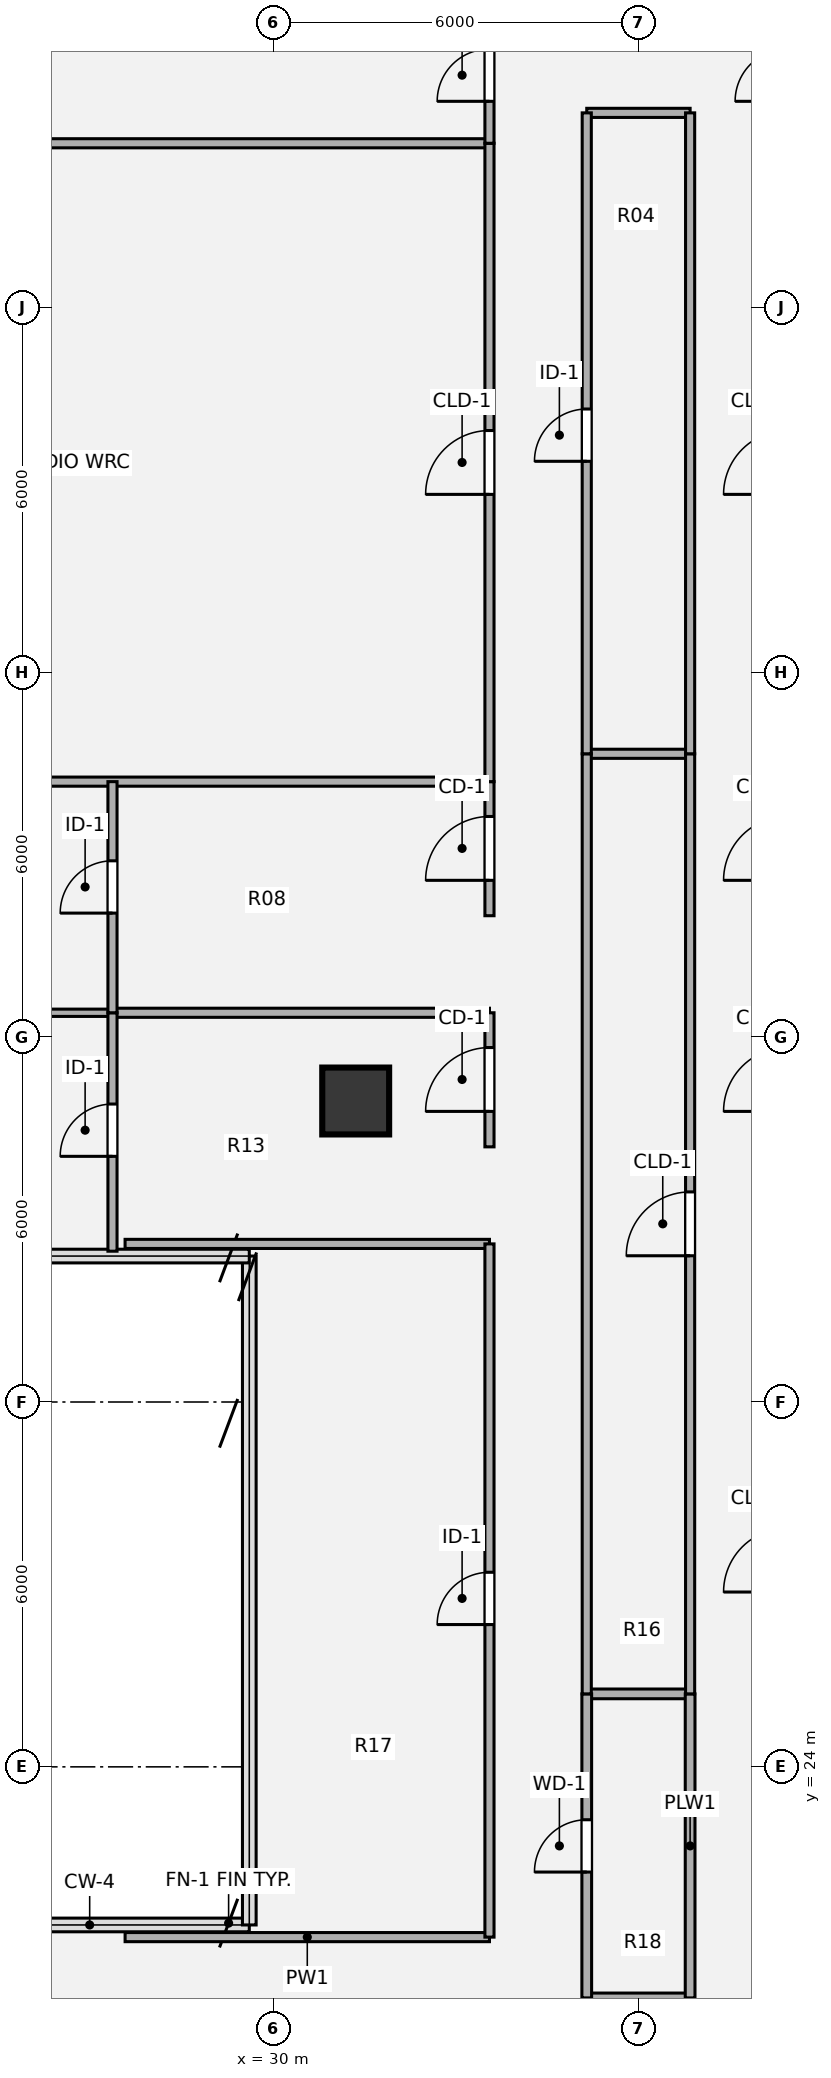
"""IFC4 building model, lengths in metres.
Left out: names, types, materials, properties, quantities, classifications, styles, units other than length and angle.
Written with IfcOpenShell. Run it as: python <this file> out.ifc"""

import sys

from ifc_helpers import new_model, si_unit, direction, frame, frame_2d, origin, origin_2d, place, context, subcontext, project, spatial, rectangle, hollow_circle, extrude, source, transform, mapped, element, fill, save


model = new_model("IFC4")
c1 = context("Model", 3, precision=1e-05, world=origin(), true_north=direction((0.0, 1.0)))
c2 = subcontext(c1, "Body", "Model", "MODEL_VIEW")
j1 = project(units=[si_unit("LENGTHUNIT", "METRE"), si_unit("PLANEANGLEUNIT", "RADIAN")], contexts=[c1])
p1 = place(None, origin())
s1 = spatial("IfcSite", under=j1, at=p1, CompositionType="ELEMENT")
p2 = place(p1, origin())
s2 = spatial("IfcBuilding", under=s1, at=p2, CompositionType="ELEMENT")
p3 = place(p2, frame((0.0, 0.0, 182.88)))
s3 = spatial("IfcBuildingStorey", under=s2, at=p3, CompositionType="ELEMENT", Elevation=182.88)
m1 = source(origin(), c2, "Body", "SweptSolid", [
    extrude(hollow_circle(Radius=0.55, WallThickness=0.04, at=origin_2d()), origin(), (0.0, 0.0, 1.0), 3.78),
])
p4 = place(p3, frame((31.35, 34.95, 0.0), z_axis=(0.0, 0.0, 1.0), x_axis=(1.0, 0.0, 0.0)))
e1 = element("IfcColumn", 1, at=p4, inside=s3, PredefinedType="COLUMN", context=c2, shape_type="MappedRepresentation", body=[
    mapped(m1, transform((0.0, 0.0, 0.0), x_axis=(1.0, 0.0, 0.0), y_axis=(0.0, 1.0, 0.0), z_axis=(0.0, 0.0, 1.0), scale=1.0)),
])
p5 = place(p3, frame((35.15, 20.2, 0.0), z_axis=(0.0, 0.0, 1.0), x_axis=(1.0, 0.0, 0.0)))
e2 = element("IfcWall", 2, at=p5, inside=s3, PredefinedType="PLUMBINGWALL", context=c2, shape_type="SweptSolid", body=[
    extrude(rectangle(XDim=1.7, YDim=0.16, at=frame_2d((0.85, 0.0))), origin(), (0.0, 0.0, 1.0), 3.5),
])
p6 = place(p3, frame((27.558, 21.2, 0.0), z_axis=(0.0, 0.0, 1.0), x_axis=(1.0, 0.0, 0.0)))
e3 = element("IfcWall", 3, at=p6, inside=s3, PredefinedType="PARTITIONING", context=c2, shape_type="SweptSolid", body=[
    extrude(rectangle(XDim=5.992, YDim=0.15, at=frame_2d((2.996, 0.0))), origin(), (0.0, 0.0, 1.0), 3.5),
])
p7 = place(p3, frame((35.15, 25.2, 0.0), z_axis=(0.0, 0.0, 1.0), x_axis=(1.0, 0.0, 0.0)))
e4 = element("IfcWall", 4, at=p7, inside=s3, PredefinedType="PLUMBINGWALL", context=c2, shape_type="SweptSolid", body=[
    extrude(rectangle(XDim=1.7, YDim=0.16, at=frame_2d((0.85, 0.0))), origin(), (0.0, 0.0, 1.0), 3.5),
])
p8 = place(p3, frame((27.557, 32.6, 0.0), z_axis=(0.0, 0.0, 1.0), x_axis=(1.0, 0.0, 0.0)))
e5 = element("IfcWall", 5, at=p8, inside=s3, PredefinedType="PARTITIONING", context=c2, shape_type="SweptSolid", body=[
    extrude(rectangle(XDim=5.993, YDim=0.15, at=frame_2d((2.997, 0.0))), origin(), (0.0, 0.0, 1.0), 3.5),
])
p9 = place(p3, frame((15.88, 36.401, 0.0), z_axis=(0.0, 0.0, 1.0), x_axis=(1.0, 0.0, 0.0)))
e6 = element("IfcWall", 6, at=p9, inside=s3, PredefinedType="PARTITIONING", context=c2, shape_type="SweptSolid", body=[
    extrude(rectangle(XDim=11.47, YDim=0.12, at=frame_2d((5.735, 0.0))), origin(), (0.0, 0.0, 1.0), 2.982),
])
p10 = place(p3, frame((27.35, 36.401, 0.0), z_axis=(0.0, 0.0, 1.0), x_axis=(1.0, 0.0, 0.0)))
e7 = element("IfcWall", 7, at=p10, inside=s3, PredefinedType="PARTITIONING", context=c2, shape_type="SweptSolid", body=[
    extrude(rectangle(XDim=6.2, YDim=0.15, at=frame_2d((3.1, 0.0))), origin(), (0.0, 0.0, 1.0), 2.982),
])
p11 = place(p3, frame((15.88, 40.202, 0.0), z_axis=(0.0, 0.0, 1.0), x_axis=(1.0, 0.0, 0.0)))
e8 = element("IfcWall", 8, at=p11, inside=s3, PredefinedType="PARTITIONING", context=c2, shape_type="SweptSolid", body=[
    extrude(rectangle(XDim=17.67, YDim=0.15, at=frame_2d((8.835, 0.0))), origin(), (0.0, 0.0, 1.0), 2.982),
])
p12 = place(p3, frame((35.15, 40.66, 0.0), z_axis=(0.0, 0.0, 1.0), x_axis=(1.0, 0.0, 0.0)))
e9 = element("IfcWall", 9, at=p12, inside=s3, PredefinedType="PARTITIONING", context=c2, shape_type="SweptSolid", body=[
    extrude(rectangle(XDim=1.7, YDim=0.15, at=frame_2d((0.85, 0.0))), origin(), (0.0, 0.0, 1.0), 3.259),
])
p13 = place(p3, frame((15.981, 50.7, 0.0), z_axis=(0.0, 0.0, 1.0), x_axis=(1.0, 0.0, 0.0)))
e10 = element("IfcWall", 10, at=p13, inside=s3, PredefinedType="PARTITIONING", context=c2, shape_type="SweptSolid", body=[
    extrude(rectangle(XDim=17.569, YDim=0.15, at=frame_2d((8.785, 0.0))), origin(), (0.0, 0.0, 1.0), 3.308),
])
p14 = place(p3, frame((35.15, 51.2, 0.0), z_axis=(0.0, 0.0, 1.0), x_axis=(1.0, 0.0, 0.0)))
e11 = element("IfcWall", 11, at=p14, inside=s3, PredefinedType="PARTITIONING", context=c2, shape_type="SweptSolid", body=[
    extrude(rectangle(XDim=1.7, YDim=0.15, at=frame_2d((0.85, 0.0))), origin(), (0.0, 0.0, 1.0), 3.308),
])
p15 = place(p3, frame((27.35, 32.48, 0.0), z_axis=(0.0, 0.0, 1.0), x_axis=(0.0, 1.0, 0.0)))
e12 = element("IfcWall", 12, at=p15, inside=s3, PredefinedType="PARTITIONING", context=c2, shape_type="SweptSolid", body=[
    extrude(rectangle(XDim=3.921, YDim=0.15, at=frame_2d((1.96, 0.0))), origin(), (0.0, 0.0, 1.0), 3.5),
])
p16 = place(p15, frame((1.56, 0.0, 0.0)))
e13 = element("IfcOpeningElement", 13, at=p16, cuts=e12, PredefinedType="OPENING", context=c2, shape_type="SweptSolid", body=[
    extrude(rectangle(XDim=0.86, YDim=2.1, at=origin_2d()), frame((0.43, 0.085, 1.05), z_axis=(0.0, -1.0, 0.0), x_axis=(1.0, 0.0, 0.0)), (0.0, 0.0, 1.0), 0.17),
])
p17 = place(p3, frame((27.35, 36.401, 0.0), z_axis=(0.0, 0.0, 1.0), x_axis=(0.0, 1.0, 0.0)))
e14 = element("IfcWall", 14, at=p17, inside=s3, PredefinedType="PARTITIONING", context=c2, shape_type="SweptSolid", body=[
    extrude(rectangle(XDim=3.801, YDim=0.15, at=frame_2d((1.9, 0.0))), origin(), (0.0, 0.0, 1.0), 3.5),
])
p18 = place(p17, frame((1.639, 0.0, 0.0)))
e15 = element("IfcOpeningElement", 15, at=p18, cuts=e14, PredefinedType="OPENING", context=c2, shape_type="SweptSolid", body=[
    extrude(rectangle(XDim=0.86, YDim=2.1, at=origin_2d()), frame((0.43, 0.085, 1.05), z_axis=(0.0, -1.0, 0.0), x_axis=(1.0, 0.0, 0.0)), (0.0, 0.0, 1.0), 0.17),
])
p19 = place(p3, frame((33.55, 21.2, 0.0), z_axis=(0.0, 0.0, 1.0), x_axis=(0.0, 1.0, 0.0)))
e16 = element("IfcWall", 16, at=p19, inside=s3, PredefinedType="PARTITIONING", context=c2, shape_type="SweptSolid", body=[
    extrude(rectangle(XDim=11.4, YDim=0.15, at=frame_2d((5.7, 0.0))), origin(), (0.0, 0.0, 1.0), 3.5),
])
p20 = place(p19, frame((5.14, 0.0, 0.0)))
e17 = element("IfcOpeningElement", 17, at=p20, cuts=e16, PredefinedType="OPENING", context=c2, shape_type="SweptSolid", body=[
    extrude(rectangle(XDim=0.86, YDim=2.1, at=origin_2d()), frame((0.43, 0.085, 1.05), z_axis=(0.0, -1.0, 0.0), x_axis=(1.0, 0.0, 0.0)), (0.0, 0.0, 1.0), 0.17),
])
p21 = place(p3, frame((33.55, 34.196, 0.0), z_axis=(0.0, 0.0, 1.0), x_axis=(0.0, 1.0, 0.0)))
e18 = element("IfcWall", 18, at=p21, inside=s3, PredefinedType="PARTITIONING", context=c2, shape_type="SweptSolid", body=[
    extrude(rectangle(XDim=2.205, YDim=0.15, at=frame_2d((1.103, 0.0))), origin(), (0.0, 0.0, 1.0), 3.5),
])
p22 = place(p21, frame((0.583, 0.0, 0.0)))
e19 = element("IfcOpeningElement", 19, at=p22, cuts=e18, PredefinedType="OPENING", context=c2, shape_type="SweptSolid", body=[
    extrude(rectangle(XDim=1.05, YDim=2.1, at=origin_2d()), frame((0.525, 0.085, 1.05), z_axis=(0.0, -1.0, 0.0), x_axis=(1.0, 0.0, 0.0)), (0.0, 0.0, 1.0), 0.17),
])
p23 = place(p3, frame((33.55, 37.997, 0.0), z_axis=(0.0, 0.0, 1.0), x_axis=(0.0, 1.0, 0.0)))
e20 = element("IfcWall", 20, at=p23, inside=s3, PredefinedType="PARTITIONING", context=c2, shape_type="SweptSolid", body=[
    extrude(rectangle(XDim=2.205, YDim=0.15, at=frame_2d((1.103, 0.0))), origin(), (0.0, 0.0, 1.0), 3.5),
])
p24 = place(p23, frame((0.582, 0.0, 0.0)))
e21 = element("IfcOpeningElement", 21, at=p24, cuts=e20, PredefinedType="OPENING", context=c2, shape_type="SweptSolid", body=[
    extrude(rectangle(XDim=1.05, YDim=2.1, at=origin_2d()), frame((0.525, 0.085, 1.05), z_axis=(0.0, -1.0, 0.0), x_axis=(1.0, 0.0, 0.0)), (0.0, 0.0, 1.0), 0.17),
])
p25 = place(p3, frame((33.55, 40.202, 0.0), z_axis=(0.0, 0.0, 1.0), x_axis=(0.0, 1.0, 0.0)))
e22 = element("IfcWall", 22, at=p25, inside=s3, PredefinedType="PARTITIONING", context=c2, shape_type="SweptSolid", body=[
    extrude(rectangle(XDim=10.498, YDim=0.15, at=frame_2d((5.249, 0.0))), origin(), (0.0, 0.0, 1.0), 3.5),
])
p26 = place(p25, frame((4.724, 0.0, 0.0)))
e23 = element("IfcOpeningElement", 23, at=p26, cuts=e22, PredefinedType="OPENING", context=c2, shape_type="SweptSolid", body=[
    extrude(rectangle(XDim=1.05, YDim=2.1, at=origin_2d()), frame((0.525, 0.085, 1.05), z_axis=(0.0, -1.0, 0.0), x_axis=(1.0, 0.0, 0.0)), (0.0, 0.0, 1.0), 0.17),
])
p27 = place(p3, frame((33.55, 50.7, 0.0), z_axis=(0.0, 0.0, 1.0), x_axis=(0.0, 1.0, 0.0)))
e24 = element("IfcWall", 24, at=p27, inside=s3, PredefinedType="PARTITIONING", context=c2, shape_type="SweptSolid", body=[
    extrude(rectangle(XDim=2.3, YDim=0.15, at=frame_2d((1.15, 0.0))), origin(), (0.0, 0.0, 1.0), 3.5),
])
p28 = place(p27, frame((0.69, 0.0, 0.0)))
e25 = element("IfcOpeningElement", 25, at=p28, cuts=e24, PredefinedType="OPENING", context=c2, shape_type="SweptSolid", body=[
    extrude(rectangle(XDim=0.86, YDim=2.1, at=origin_2d()), frame((0.43, 0.085, 1.05), z_axis=(0.0, -1.0, 0.0), x_axis=(1.0, 0.0, 0.0)), (0.0, 0.0, 1.0), 0.17),
])
p29 = place(p3, frame((35.15, 20.2, 0.0), z_axis=(0.0, 0.0, 1.0), x_axis=(0.0, 1.0, 0.0)))
e26 = element("IfcWall", 26, at=p29, inside=s3, PredefinedType="PLUMBINGWALL", context=c2, shape_type="SweptSolid", body=[
    extrude(rectangle(XDim=5.0, YDim=0.16, at=frame_2d((2.5, 0.0))), origin(), (0.0, 0.0, 1.0), 3.5),
])
p30 = place(p29, frame((2.07, 0.0, 0.0)))
e27 = element("IfcOpeningElement", 27, at=p30, cuts=e26, PredefinedType="OPENING", context=c2, shape_type="SweptSolid", body=[
    extrude(rectangle(XDim=0.86, YDim=2.1, at=origin_2d()), frame((0.43, 0.09, 1.05), z_axis=(0.0, -1.0, 0.0), x_axis=(1.0, 0.0, 0.0)), (0.0, 0.0, 1.0), 0.18),
])
p31 = place(p3, frame((35.15, 25.2, 0.0), z_axis=(0.0, 0.0, 1.0), x_axis=(0.0, 1.0, 0.0)))
e28 = element("IfcWall", 28, at=p31, inside=s3, PredefinedType="PARTITIONING", context=c2, shape_type="SweptSolid", body=[
    extrude(rectangle(XDim=15.46, YDim=0.15, at=frame_2d((7.73, 0.0))), origin(), (0.0, 0.0, 1.0), 3.5),
])
p32 = place(p3, frame((35.15, 40.66, 0.0), z_axis=(0.0, 0.0, 1.0), x_axis=(0.0, 1.0, 0.0)))
e29 = element("IfcWall", 29, at=p32, inside=s3, PredefinedType="PARTITIONING", context=c2, shape_type="SweptSolid", body=[
    extrude(rectangle(XDim=10.54, YDim=0.15, at=frame_2d((5.27, 0.0))), origin(), (0.0, 0.0, 1.0), 3.5),
])
p33 = place(p32, frame((4.81, 0.0, 0.0)))
e30 = element("IfcOpeningElement", 30, at=p33, cuts=e29, PredefinedType="OPENING", context=c2, shape_type="SweptSolid", body=[
    extrude(rectangle(XDim=0.86, YDim=2.1, at=origin_2d()), frame((0.43, 0.085, 1.05), z_axis=(0.0, -1.0, 0.0), x_axis=(1.0, 0.0, 0.0)), (0.0, 0.0, 1.0), 0.17),
])
p34 = place(p3, frame((36.85, 20.2, 0.0), z_axis=(0.0, 0.0, 1.0), x_axis=(0.0, 1.0, 0.0)))
e31 = element("IfcWall", 31, at=p34, inside=s3, PredefinedType="PLUMBINGWALL", context=c2, shape_type="SweptSolid", body=[
    extrude(rectangle(XDim=5.0, YDim=0.16, at=frame_2d((2.5, 0.0))), origin(), (0.0, 0.0, 1.0), 3.5),
])
p35 = place(p3, frame((36.85, 25.2, 0.0), z_axis=(0.0, 0.0, 1.0), x_axis=(0.0, 1.0, 0.0)))
e32 = element("IfcWall", 32, at=p35, inside=s3, PredefinedType="PARTITIONING", context=c2, shape_type="SweptSolid", body=[
    extrude(rectangle(XDim=15.46, YDim=0.15, at=frame_2d((7.73, 0.0))), origin(), (0.0, 0.0, 1.0), 3.5),
])
p36 = place(p35, frame((7.205, 0.0, 0.0)))
e33 = element("IfcOpeningElement", 33, at=p36, cuts=e32, PredefinedType="OPENING", context=c2, shape_type="SweptSolid", body=[
    extrude(rectangle(XDim=1.05, YDim=2.1, at=origin_2d()), frame((0.525, 0.085, 1.05), z_axis=(0.0, -1.0, 0.0), x_axis=(1.0, 0.0, 0.0)), (0.0, 0.0, 1.0), 0.17),
])
p37 = place(p3, frame((36.85, 40.66, 0.0), z_axis=(0.0, 0.0, 1.0), x_axis=(0.0, 1.0, 0.0)))
e34 = element("IfcWall", 34, at=p37, inside=s3, PredefinedType="PARTITIONING", context=c2, shape_type="SweptSolid", body=[
    extrude(rectangle(XDim=10.54, YDim=0.15, at=frame_2d((5.27, 0.0))), origin(), (0.0, 0.0, 1.0), 3.5),
])
m2 = source(origin(), c2, "Body", "SweptSolid", [
    extrude(rectangle(XDim=0.86, YDim=2.1, at=origin_2d()), frame((0.43, 0.025, 1.05), z_axis=(0.0, -1.0, 0.0), x_axis=(1.0, 0.0, 0.0)), (0.0, 0.0, 1.0), 0.05),
])
p38 = place(p16, origin())
e35 = element("IfcDoor", 35, at=p38, inside=s3, OperationType="SINGLE_SWING_LEFT", PredefinedType="DOOR", context=c2, shape_type="MappedRepresentation", body=[
    mapped(m2, transform((0.0, 0.0, 0.0), x_axis=(1.0, 0.0, 0.0), y_axis=(0.0, 1.0, 0.0), z_axis=(0.0, 0.0, 1.0), scale=1.0)),
])
fill(e13, e35)
p39 = place(p18, origin())
e36 = element("IfcDoor", 36, at=p39, inside=s3, OperationType="SINGLE_SWING_LEFT", PredefinedType="DOOR", context=c2, shape_type="MappedRepresentation", body=[
    mapped(m2, transform((0.0, 0.0, 0.0), x_axis=(1.0, 0.0, 0.0), y_axis=(0.0, 1.0, 0.0), z_axis=(0.0, 0.0, 1.0), scale=1.0)),
])
fill(e15, e36)
p40 = place(p20, origin())
e37 = element("IfcDoor", 37, at=p40, inside=s3, OperationType="SINGLE_SWING_LEFT", PredefinedType="DOOR", context=c2, shape_type="MappedRepresentation", body=[
    mapped(m2, transform((0.0, 0.0, 0.0), x_axis=(1.0, 0.0, 0.0), y_axis=(0.0, 1.0, 0.0), z_axis=(0.0, 0.0, 1.0), scale=1.0)),
])
fill(e17, e37)
m3 = source(origin(), c2, "Body", "SweptSolid", [
    extrude(rectangle(XDim=1.05, YDim=2.1, at=origin_2d()), frame((0.525, 0.025, 1.05), z_axis=(0.0, -1.0, 0.0), x_axis=(1.0, 0.0, 0.0)), (0.0, 0.0, 1.0), 0.05),
])
p41 = place(p22, origin())
e38 = element("IfcDoor", 38, at=p41, inside=s3, OperationType="SINGLE_SWING_LEFT", PredefinedType="DOOR", context=c2, shape_type="MappedRepresentation", body=[
    mapped(m3, transform((0.0, 0.0, 0.0), x_axis=(1.0, 0.0, 0.0), y_axis=(0.0, 1.0, 0.0), z_axis=(0.0, 0.0, 1.0), scale=1.0)),
])
fill(e19, e38)
p42 = place(p24, origin())
e39 = element("IfcDoor", 39, at=p42, inside=s3, OperationType="SINGLE_SWING_LEFT", PredefinedType="DOOR", context=c2, shape_type="MappedRepresentation", body=[
    mapped(m3, transform((0.0, 0.0, 0.0), x_axis=(1.0, 0.0, 0.0), y_axis=(0.0, 1.0, 0.0), z_axis=(0.0, 0.0, 1.0), scale=1.0)),
])
fill(e21, e39)
m4 = source(origin(), c2, "Body", "SweptSolid", [
    extrude(rectangle(XDim=1.05, YDim=2.1, at=origin_2d()), frame((0.525, 0.025, 1.05), z_axis=(0.0, -1.0, 0.0), x_axis=(1.0, 0.0, 0.0)), (0.0, 0.0, 1.0), 0.05),
])
p43 = place(p26, origin())
e40 = element("IfcDoor", 40, at=p43, inside=s3, OperationType="SINGLE_SWING_LEFT", PredefinedType="DOOR", context=c2, shape_type="MappedRepresentation", body=[
    mapped(m4, transform((0.0, 0.0, 0.0), x_axis=(1.0, 0.0, 0.0), y_axis=(0.0, 1.0, 0.0), z_axis=(0.0, 0.0, 1.0), scale=1.0)),
])
fill(e23, e40)
p44 = place(p28, origin())
e41 = element("IfcDoor", 41, at=p44, inside=s3, OperationType="SINGLE_SWING_LEFT", PredefinedType="DOOR", context=c2, shape_type="MappedRepresentation", body=[
    mapped(m2, transform((0.0, 0.0, 0.0), x_axis=(1.0, 0.0, 0.0), y_axis=(0.0, 1.0, 0.0), z_axis=(0.0, 0.0, 1.0), scale=1.0)),
])
fill(e25, e41)
m5 = source(origin(), c2, "Body", "SweptSolid", [
    extrude(rectangle(XDim=0.86, YDim=2.1, at=origin_2d()), frame((0.43, 0.025, 1.05), z_axis=(0.0, -1.0, 0.0), x_axis=(1.0, 0.0, 0.0)), (0.0, 0.0, 1.0), 0.05),
])
p45 = place(p30, origin())
e42 = element("IfcDoor", 42, at=p45, inside=s3, OperationType="SINGLE_SWING_LEFT", PredefinedType="DOOR", context=c2, shape_type="MappedRepresentation", body=[
    mapped(m5, transform((0.0, 0.0, 0.0), x_axis=(1.0, 0.0, 0.0), y_axis=(0.0, 1.0, 0.0), z_axis=(0.0, 0.0, 1.0), scale=1.0)),
])
fill(e27, e42)
p46 = place(p33, origin())
e43 = element("IfcDoor", 43, at=p46, inside=s3, OperationType="SINGLE_SWING_LEFT", PredefinedType="DOOR", context=c2, shape_type="MappedRepresentation", body=[
    mapped(m2, transform((0.0, 0.0, 0.0), x_axis=(1.0, 0.0, 0.0), y_axis=(0.0, 1.0, 0.0), z_axis=(0.0, 0.0, 1.0), scale=1.0)),
])
fill(e30, e43)
p47 = place(p36, origin())
e44 = element("IfcDoor", 44, at=p47, inside=s3, OperationType="SINGLE_SWING_LEFT", PredefinedType="DOOR", context=c2, shape_type="MappedRepresentation", body=[
    mapped(m4, transform((0.0, 0.0, 0.0), x_axis=(1.0, 0.0, 0.0), y_axis=(0.0, 1.0, 0.0), z_axis=(0.0, 0.0, 1.0), scale=1.0)),
])
fill(e33, e44)
save(model, sys.argv[1])
